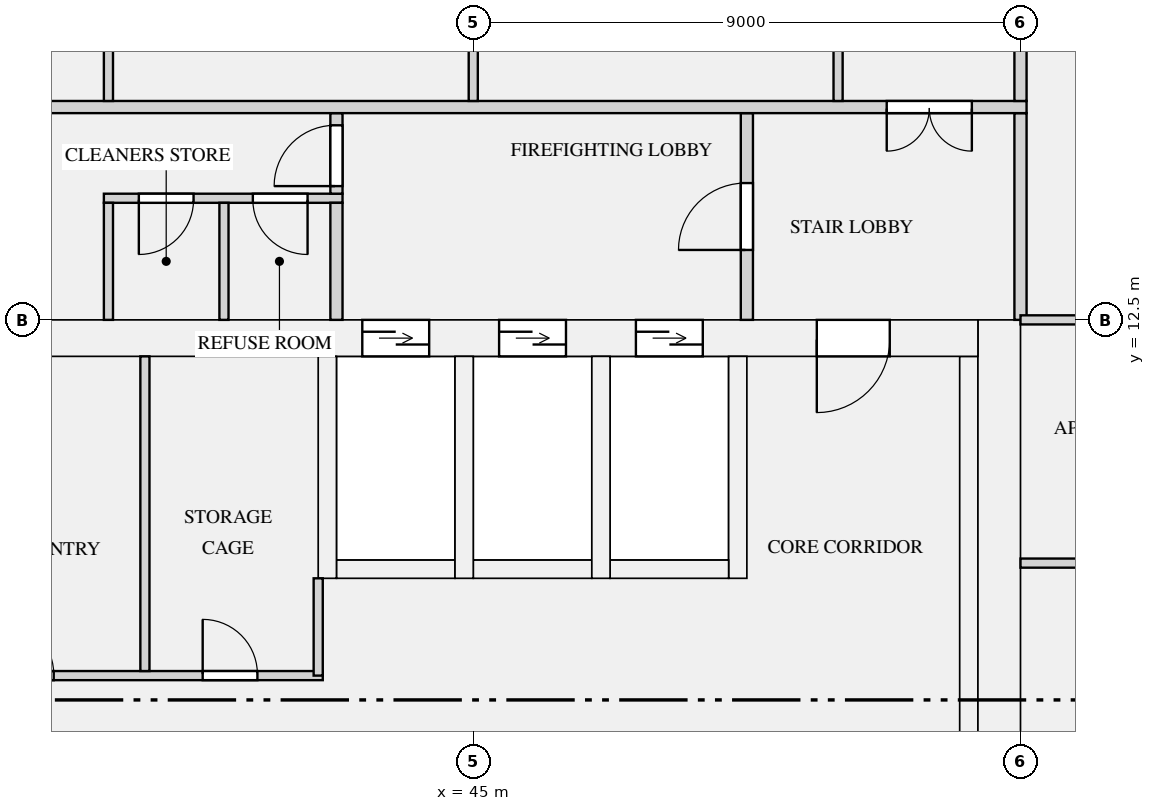
"""IFC4 building model, lengths in metres.
Left out: names, types, materials, properties, quantities, classifications, styles, units other than length and angle.
Written with IfcOpenShell. Run it as: python <this file> out.ifc"""

import sys

from ifc_helpers import new_model, si_unit, direction, frame, frame_2d, origin, place, context, subcontext, project, spatial, rectangle, extrude, element, fill, save


model = new_model("IFC4")
c1 = context("Model", 3, precision=1e-05, world=origin(), true_north=direction((0.0, 1.0)))
c2 = subcontext(c1, "Body", "Model", "MODEL_VIEW")
j1 = project(units=[si_unit("LENGTHUNIT", "METRE"), si_unit("PLANEANGLEUNIT", "RADIAN")], contexts=[c1])
p1 = place(None, origin())
s1 = spatial("IfcSite", under=j1, at=p1, CompositionType="ELEMENT")
p2 = place(p1, origin())
s2 = spatial("IfcBuilding", under=s1, at=p2, CompositionType="ELEMENT")
p3 = place(p2, frame((0.0, 0.0, 141.3)))
s3 = spatial("IfcBuildingStorey", under=s2, at=p3, CompositionType="ELEMENT", Elevation=141.3)
p4 = place(p3, frame((53.65, 0.0, 0.0), z_axis=(0.0, 0.0, 1.0), x_axis=(0.0, 1.0, 0.0)))
e1 = element("IfcWall", 1, at=p4, inside=s3, PredefinedType="SHEAR", context=c2, shape_type="SweptSolid", body=[
    extrude(rectangle(XDim=12.5, YDim=0.7, at=frame_2d((6.25, 0.0))), origin(), (0.0, 0.0, 1.0), 3.15),
])
p5 = place(p3, frame((18.7, 12.2, 0.0), z_axis=(0.0, 0.0, 1.0), x_axis=(1.0, 0.0, 0.0)))
e2 = element("IfcWall", 2, at=p5, inside=s3, PredefinedType="SHEAR", context=c2, shape_type="SweptSolid", body=[
    extrude(rectangle(XDim=34.6, YDim=0.6, at=frame_2d((17.3, 0.0))), origin(), (0.0, 0.0, 1.0), 3.15),
])
p6 = place(p5, frame((24.475, 0.0, 0.0)))
e3 = element("IfcOpeningElement", 3, at=p6, cuts=e2, PredefinedType="OPENING", context=c2, shape_type="SweptSolid", body=[
    extrude(rectangle(XDim=1.1, YDim=2.1, at=frame_2d((0.55, 1.05))), frame((0.0, 0.31, 0.0), z_axis=(0.0, -1.0, 0.0), x_axis=(1.0, 0.0, 0.0)), (0.0, 0.0, 1.0), 0.62),
])
p7 = place(p5, frame((26.725, 0.0, 0.0)))
e4 = element("IfcOpeningElement", 4, at=p7, cuts=e2, PredefinedType="OPENING", context=c2, shape_type="SweptSolid", body=[
    extrude(rectangle(XDim=1.1, YDim=2.1, at=frame_2d((0.55, 1.05))), frame((0.0, 0.31, 0.0), z_axis=(0.0, -1.0, 0.0), x_axis=(1.0, 0.0, 0.0)), (0.0, 0.0, 1.0), 0.62),
])
p8 = place(p5, frame((28.975, 0.0, 0.0)))
e5 = element("IfcOpeningElement", 5, at=p8, cuts=e2, PredefinedType="OPENING", context=c2, shape_type="SweptSolid", body=[
    extrude(rectangle(XDim=1.1, YDim=2.1, at=frame_2d((0.55, 1.05))), frame((0.0, 0.31, 0.0), z_axis=(0.0, -1.0, 0.0), x_axis=(1.0, 0.0, 0.0)), (0.0, 0.0, 1.0), 0.62),
])
p9 = place(p5, frame((14.35, 0.0, 0.0)))
e6 = element("IfcOpeningElement", 6, at=p9, cuts=e2, PredefinedType="OPENING", context=c2, shape_type="SweptSolid", body=[
    extrude(rectangle(XDim=0.9, YDim=2.1, at=frame_2d((0.45, 1.05))), frame((0.0, 0.31, 0.0), z_axis=(0.0, -1.0, 0.0), x_axis=(1.0, 0.0, 0.0)), (0.0, 0.0, 1.0), 0.62),
])
p10 = place(p5, frame((1.45, 0.0, 0.0)))
e7 = element("IfcOpeningElement", 7, at=p10, cuts=e2, PredefinedType="OPENING", context=c2, shape_type="SweptSolid", body=[
    extrude(rectangle(XDim=1.2, YDim=2.1, at=frame_2d((0.6, 1.05))), frame((0.0, 0.31, 0.0), z_axis=(0.0, -1.0, 0.0), x_axis=(1.0, 0.0, 0.0)), (0.0, 0.0, 1.0), 0.62),
])
p11 = place(p5, frame((31.95, 0.0, 0.0)))
e8 = element("IfcOpeningElement", 8, at=p11, cuts=e2, PredefinedType="OPENING", context=c2, shape_type="SweptSolid", body=[
    extrude(rectangle(XDim=1.2, YDim=2.1, at=frame_2d((0.6, 1.05))), frame((0.0, 0.31, 0.0), z_axis=(0.0, -1.0, 0.0), x_axis=(1.0, 0.0, 0.0)), (0.0, 0.0, 1.0), 0.62),
])
p12 = place(p3, frame((53.15, 1.0, 0.0), z_axis=(0.0, 0.0, 1.0), x_axis=(0.0, 1.0, 0.0)))
e9 = element("IfcWall", 9, at=p12, inside=s3, PredefinedType="SHEAR", context=c2, shape_type="SweptSolid", body=[
    extrude(rectangle(XDim=10.9, YDim=0.3, at=frame_2d((5.45, 0.0))), origin(), (0.0, 0.0, 1.0), 3.15),
])
p13 = place(p3, frame((42.75, 8.4, 0.0), z_axis=(0.0, 0.0, 1.0), x_axis=(1.0, 0.0, 0.0)))
e10 = element("IfcWall", 10, at=p13, inside=s3, PredefinedType="SHEAR", context=c2, shape_type="SweptSolid", body=[
    extrude(rectangle(XDim=1.95, YDim=0.3, at=frame_2d((0.975, 0.0))), origin(), (0.0, 0.0, 1.0), 3.15),
])
p14 = place(p3, frame((42.6, 8.25, 0.0), z_axis=(0.0, 0.0, 1.0), x_axis=(0.0, 1.0, 0.0)))
e11 = element("IfcWall", 11, at=p14, inside=s3, PredefinedType="SHEAR", context=c2, shape_type="SweptSolid", body=[
    extrude(rectangle(XDim=3.65, YDim=0.3, at=frame_2d((1.825, 0.0))), origin(), (0.0, 0.0, 1.0), 3.15),
])
p15 = place(p3, frame((45.0, 8.4, 0.0), z_axis=(0.0, 0.0, 1.0), x_axis=(1.0, 0.0, 0.0)))
e12 = element("IfcWall", 12, at=p15, inside=s3, PredefinedType="SHEAR", context=c2, shape_type="SweptSolid", body=[
    extrude(rectangle(XDim=1.95, YDim=0.3, at=frame_2d((0.975, 0.0))), origin(), (0.0, 0.0, 1.0), 3.15),
])
p16 = place(p3, frame((44.85, 8.25, 0.0), z_axis=(0.0, 0.0, 1.0), x_axis=(0.0, 1.0, 0.0)))
e13 = element("IfcWall", 13, at=p16, inside=s3, PredefinedType="SHEAR", context=c2, shape_type="SweptSolid", body=[
    extrude(rectangle(XDim=3.65, YDim=0.3, at=frame_2d((1.825, 0.0))), origin(), (0.0, 0.0, 1.0), 3.15),
])
p17 = place(p3, frame((47.25, 8.4, 0.0), z_axis=(0.0, 0.0, 1.0), x_axis=(1.0, 0.0, 0.0)))
e14 = element("IfcWall", 14, at=p17, inside=s3, PredefinedType="SHEAR", context=c2, shape_type="SweptSolid", body=[
    extrude(rectangle(XDim=1.95, YDim=0.3, at=frame_2d((0.975, 0.0))), origin(), (0.0, 0.0, 1.0), 3.15),
])
for number, where, z_axis, x_axis in (
    (15, (47.1, 8.25, 0.0), (0.0, 0.0, 1.0), (0.0, 1.0, 0.0)),
    (16, (49.35, 8.25, 0.0), (0.0, 0.0, 1.0), (0.0, 1.0, 0.0)),
):
    element("IfcWall", number, at=place(p3, frame(where, z_axis=z_axis, x_axis=x_axis)), inside=s3, PredefinedType="SHEAR", context=c2, shape_type="SweptSolid", body=[
        extrude(rectangle(XDim=3.65, YDim=0.3, at=frame_2d((1.825, 0.0))), origin(), (0.0, 0.0, 1.0), 3.15),
    ])
p18 = place(p3, frame((22.725, 6.65, 0.0), z_axis=(0.0, 0.0, 1.0), x_axis=(1.0, 0.0, 0.0)))
e17 = element("IfcWall", 17, at=p18, inside=s3, PredefinedType="PARTITIONING", context=c2, shape_type="SweptSolid", body=[
    extrude(rectangle(XDim=19.8, YDim=0.15, at=frame_2d((9.9, 0.0))), origin(), (0.0, 0.0, 1.0), 2.83),
])
p19 = place(p18, frame((0.825, 0.0, 0.0)))
e18 = element("IfcOpeningElement", 18, at=p19, cuts=e17, PredefinedType="OPENING", context=c2, shape_type="SweptSolid", body=[
    extrude(rectangle(XDim=0.9, YDim=2.1, at=frame_2d((0.45, 1.05))), frame((0.0, 0.085, 0.0), z_axis=(0.0, -1.0, 0.0), x_axis=(1.0, 0.0, 0.0)), (0.0, 0.0, 1.0), 0.17),
])
p20 = place(p18, frame((5.825, 0.0, 0.0)))
e19 = element("IfcOpeningElement", 19, at=p20, cuts=e17, PredefinedType="OPENING", context=c2, shape_type="SweptSolid", body=[
    extrude(rectangle(XDim=0.9, YDim=2.1, at=frame_2d((0.45, 1.05))), frame((0.0, 0.085, 0.0), z_axis=(0.0, -1.0, 0.0), x_axis=(1.0, 0.0, 0.0)), (0.0, 0.0, 1.0), 0.17),
])
p21 = place(p18, frame((10.325, 0.0, 0.0)))
e20 = element("IfcOpeningElement", 20, at=p21, cuts=e17, PredefinedType="OPENING", context=c2, shape_type="SweptSolid", body=[
    extrude(rectangle(XDim=0.9, YDim=2.1, at=frame_2d((0.45, 1.05))), frame((0.0, 0.085, 0.0), z_axis=(0.0, -1.0, 0.0), x_axis=(1.0, 0.0, 0.0)), (0.0, 0.0, 1.0), 0.17),
])
p22 = place(p18, frame((14.475, 0.0, 0.0)))
e21 = element("IfcOpeningElement", 21, at=p22, cuts=e17, PredefinedType="OPENING", context=c2, shape_type="SweptSolid", body=[
    extrude(rectangle(XDim=0.9, YDim=2.1, at=frame_2d((0.45, 1.05))), frame((0.0, 0.085, 0.0), z_axis=(0.0, -1.0, 0.0), x_axis=(1.0, 0.0, 0.0)), (0.0, 0.0, 1.0), 0.17),
])
p23 = place(p18, frame((17.825, 0.0, 0.0)))
e22 = element("IfcOpeningElement", 22, at=p23, cuts=e17, PredefinedType="OPENING", context=c2, shape_type="SweptSolid", body=[
    extrude(rectangle(XDim=0.9, YDim=2.1, at=frame_2d((0.45, 1.05))), frame((0.0, 0.085, 0.0), z_axis=(0.0, -1.0, 0.0), x_axis=(1.0, 0.0, 0.0)), (0.0, 0.0, 1.0), 0.17),
])
p24 = place(p3, frame((38.925, 14.5, 0.0), z_axis=(0.0, 0.0, 1.0), x_axis=(1.0, 0.0, 0.0)))
e23 = element("IfcWall", 23, at=p24, inside=s3, PredefinedType="PARTITIONING", context=c2, shape_type="SweptSolid", body=[
    extrude(rectangle(XDim=3.925, YDim=0.15, at=frame_2d((1.962, 0.0))), origin(), (0.0, 0.0, 1.0), 2.83),
])
p25 = place(p24, frame((0.575, 0.0, 0.0)))
e24 = element("IfcOpeningElement", 24, at=p25, cuts=e23, PredefinedType="OPENING", context=c2, shape_type="SweptSolid", body=[
    extrude(rectangle(XDim=0.9, YDim=2.1, at=frame_2d((0.45, 1.05))), frame((0.0, 0.085, 0.0), z_axis=(0.0, -1.0, 0.0), x_axis=(1.0, 0.0, 0.0)), (0.0, 0.0, 1.0), 0.17),
])
p26 = place(p24, frame((2.45, 0.0, 0.0)))
e25 = element("IfcOpeningElement", 25, at=p26, cuts=e23, PredefinedType="OPENING", context=c2, shape_type="SweptSolid", body=[
    extrude(rectangle(XDim=0.9, YDim=2.1, at=frame_2d((0.45, 1.05))), frame((0.0, 0.085, 0.0), z_axis=(0.0, -1.0, 0.0), x_axis=(1.0, 0.0, 0.0)), (0.0, 0.0, 1.0), 0.17),
])
p27 = place(p3, frame((42.45, 6.65, 0.0), z_axis=(0.0, 0.0, 1.0), x_axis=(0.0, 1.0, 0.0)))
e26 = element("IfcWall", 26, at=p27, inside=s3, PredefinedType="PARTITIONING", context=c2, shape_type="SweptSolid", body=[
    extrude(rectangle(XDim=1.6, YDim=0.15, at=frame_2d((0.8, 0.0))), origin(), (0.0, 0.0, 1.0), 2.83),
])
p28 = place(p3, frame((39.6, 6.725, 0.0), z_axis=(0.0, 0.0, 1.0), x_axis=(0.0, 1.0, 0.0)))
e27 = element("IfcWall", 27, at=p28, inside=s3, PredefinedType="PARTITIONING", context=c2, shape_type="SweptSolid", body=[
    extrude(rectangle(XDim=5.175, YDim=0.15, at=frame_2d((2.587, 0.0))), origin(), (0.0, 0.0, 1.0), 2.83),
])
for number, where, z_axis, x_axis in (
    (28, (39.0, 12.5, 0.0), (0.0, 0.0, 1.0), (0.0, 1.0, 0.0)),
    (29, (40.9, 12.5, 0.0), (0.0, 0.0, 1.0), (0.0, 1.0, 0.0)),
):
    element("IfcWall", number, at=place(p3, frame(where, z_axis=z_axis, x_axis=x_axis)), inside=s3, PredefinedType="PARTITIONING", context=c2, shape_type="SweptSolid", body=[
        extrude(rectangle(XDim=1.925, YDim=0.15, at=frame_2d((0.962, 0.0))), origin(), (0.0, 0.0, 1.0), 2.83),
    ])
p29 = place(p3, frame((42.75, 12.5, 0.0), z_axis=(0.0, 0.0, 1.0), x_axis=(0.0, 1.0, 0.0)))
e30 = element("IfcWall", 30, at=p29, inside=s3, PredefinedType="PARTITIONING", context=c2, shape_type="SweptSolid", body=[
    extrude(rectangle(XDim=1.925, YDim=0.2, at=frame_2d((0.962, 0.0))), origin(), (0.0, 0.0, 1.0), 2.83),
])
p30 = place(p3, frame((49.5, 12.5, 0.0), z_axis=(0.0, 0.0, 1.0), x_axis=(0.0, 1.0, 0.0)))
e31 = element("IfcWall", 31, at=p30, inside=s3, PredefinedType="PARTITIONING", context=c2, shape_type="SweptSolid", body=[
    extrude(rectangle(XDim=3.4, YDim=0.2, at=frame_2d((1.7, 0.0))), origin(), (0.0, 0.0, 1.0), 2.83),
])
p31 = place(p30, frame((1.15, 0.0, 0.0)))
e32 = element("IfcOpeningElement", 32, at=p31, cuts=e31, PredefinedType="OPENING", context=c2, shape_type="SweptSolid", body=[
    extrude(rectangle(XDim=1.1, YDim=2.1, at=frame_2d((0.55, 1.05))), frame((0.0, 0.11, 0.0), z_axis=(0.0, -1.0, 0.0), x_axis=(1.0, 0.0, 0.0)), (0.0, 0.0, 1.0), 0.22),
])
p32 = place(p3, frame((54.0, 12.5, 0.0), z_axis=(0.0, 0.0, 1.0), x_axis=(0.0, 1.0, 0.0)))
e33 = element("IfcWall", 33, at=p32, inside=s3, PredefinedType="PARTITIONING", context=c2, shape_type="SweptSolid", body=[
    extrude(rectangle(XDim=3.4, YDim=0.2, at=frame_2d((1.7, 0.0))), origin(), (0.0, 0.0, 1.0), 2.83),
])
p33 = place(p3, frame((42.75, 14.575, 0.0), z_axis=(0.0, 0.0, 1.0), x_axis=(0.0, 1.0, 0.0)))
e34 = element("IfcWall", 34, at=p33, inside=s3, PredefinedType="PARTITIONING", context=c2, shape_type="SweptSolid", body=[
    extrude(rectangle(XDim=1.325, YDim=0.2, at=frame_2d((0.663, 0.0))), origin(), (0.0, 0.0, 1.0), 2.83),
])
p34 = place(p33, frame((0.125, 0.0, 0.0)))
e35 = element("IfcOpeningElement", 35, at=p34, cuts=e34, PredefinedType="OPENING", context=c2, shape_type="SweptSolid", body=[
    extrude(rectangle(XDim=1.0, YDim=2.1, at=frame_2d((0.5, 1.05))), frame((0.0, 0.11, 0.0), z_axis=(0.0, -1.0, 0.0), x_axis=(1.0, 0.0, 0.0)), (0.0, 0.0, 1.0), 0.22),
])
p35 = place(p3, frame((54.0, 8.5, 0.0), z_axis=(0.0, 0.0, 1.0), x_axis=(1.0, 0.0, 0.0)))
e36 = element("IfcWall", 36, at=p35, inside=s3, PredefinedType="PARTITIONING", context=c2, shape_type="SweptSolid", body=[
    extrude(rectangle(XDim=17.3, YDim=0.15, at=frame_2d((8.65, 0.0))), origin(), (0.0, 0.0, 1.0), 2.83),
])
p36 = place(p35, frame((1.8, 0.0, 0.0)))
e37 = element("IfcOpeningElement", 37, at=p36, cuts=e36, PredefinedType="OPENING", context=c2, shape_type="SweptSolid", body=[
    extrude(rectangle(XDim=0.9, YDim=2.1, at=frame_2d((0.45, 1.05))), frame((0.0, 0.085, 0.0), z_axis=(0.0, -1.0, 0.0), x_axis=(1.0, 0.0, 0.0)), (0.0, 0.0, 1.0), 0.17),
])
p37 = place(p35, frame((6.3, 0.0, 0.0)))
e38 = element("IfcOpeningElement", 38, at=p37, cuts=e36, PredefinedType="OPENING", context=c2, shape_type="SweptSolid", body=[
    extrude(rectangle(XDim=0.9, YDim=2.1, at=frame_2d((0.45, 1.05))), frame((0.0, 0.085, 0.0), z_axis=(0.0, -1.0, 0.0), x_axis=(1.0, 0.0, 0.0)), (0.0, 0.0, 1.0), 0.17),
])
p38 = place(p35, frame((10.8, 0.0, 0.0)))
e39 = element("IfcOpeningElement", 39, at=p38, cuts=e36, PredefinedType="OPENING", context=c2, shape_type="SweptSolid", body=[
    extrude(rectangle(XDim=0.9, YDim=2.1, at=frame_2d((0.45, 1.05))), frame((0.0, 0.085, 0.0), z_axis=(0.0, -1.0, 0.0), x_axis=(1.0, 0.0, 0.0)), (0.0, 0.0, 1.0), 0.17),
])
p39 = place(p35, frame((15.025, 0.0, 0.0)))
e40 = element("IfcOpeningElement", 40, at=p39, cuts=e36, PredefinedType="OPENING", context=c2, shape_type="SweptSolid", body=[
    extrude(rectangle(XDim=0.9, YDim=2.1, at=frame_2d((0.45, 1.05))), frame((0.0, 0.085, 0.0), z_axis=(0.0, -1.0, 0.0), x_axis=(1.0, 0.0, 0.0)), (0.0, 0.0, 1.0), 0.17),
])
p40 = place(p3, frame((54.0, 12.5, 0.0), z_axis=(0.0, 0.0, 1.0), x_axis=(1.0, 0.0, 0.0)))
e41 = element("IfcWall", 41, at=p40, inside=s3, PredefinedType="PARTITIONING", context=c2, shape_type="SweptSolid", body=[
    extrude(rectangle(XDim=17.3, YDim=0.15, at=frame_2d((8.65, 0.0))), origin(), (0.0, 0.0, 1.0), 2.83),
])
p41 = place(p40, frame((1.5, 0.0, 0.0)))
e42 = element("IfcOpeningElement", 42, at=p41, cuts=e41, PredefinedType="OPENING", context=c2, shape_type="SweptSolid", body=[
    extrude(rectangle(XDim=1.5, YDim=2.1, at=frame_2d((0.75, 1.05))), frame((0.0, 0.085, 0.0), z_axis=(0.0, -1.0, 0.0), x_axis=(1.0, 0.0, 0.0)), (0.0, 0.0, 1.0), 0.17),
])
p42 = place(p40, frame((7.05, 0.0, 0.0)))
e43 = element("IfcOpeningElement", 43, at=p42, cuts=e41, PredefinedType="OPENING", context=c2, shape_type="SweptSolid", body=[
    extrude(rectangle(XDim=0.9, YDim=2.1, at=frame_2d((0.45, 1.05))), frame((0.0, 0.085, 0.0), z_axis=(0.0, -1.0, 0.0), x_axis=(1.0, 0.0, 0.0)), (0.0, 0.0, 1.0), 0.17),
])
p43 = place(p40, frame((12.75, 0.0, 0.0)))
e44 = element("IfcOpeningElement", 44, at=p43, cuts=e41, PredefinedType="OPENING", context=c2, shape_type="SweptSolid", body=[
    extrude(rectangle(XDim=1.5, YDim=2.1, at=frame_2d((0.75, 1.05))), frame((0.0, 0.085, 0.0), z_axis=(0.0, -1.0, 0.0), x_axis=(1.0, 0.0, 0.0)), (0.0, 0.0, 1.0), 0.17),
])
p44 = place(p3, frame((17.9, 16.0, 0.0), z_axis=(0.0, 0.0, 1.0), x_axis=(1.0, 0.0, 0.0)))
e45 = element("IfcWall", 45, at=p44, inside=s3, PredefinedType="PARTITIONING", context=c2, shape_type="SweptSolid", body=[
    extrude(rectangle(XDim=36.2, YDim=0.2, at=frame_2d((18.1, 0.0))), origin(), (0.0, 0.0, 1.0), 2.83),
])
p45 = place(p44, frame((0.9, 0.0, 0.0)))
e46 = element("IfcOpeningElement", 46, at=p45, cuts=e45, PredefinedType="OPENING", context=c2, shape_type="SweptSolid", body=[
    extrude(rectangle(XDim=1.4, YDim=2.1, at=frame_2d((0.7, 1.05))), frame((0.0, 0.11, 0.0), z_axis=(0.0, -1.0, 0.0), x_axis=(1.0, 0.0, 0.0)), (0.0, 0.0, 1.0), 0.22),
])
p46 = place(p44, frame((33.9, 0.0, 0.0)))
e47 = element("IfcOpeningElement", 47, at=p46, cuts=e45, PredefinedType="OPENING", context=c2, shape_type="SweptSolid", body=[
    extrude(rectangle(XDim=1.4, YDim=2.1, at=frame_2d((0.7, 1.05))), frame((0.0, 0.11, 0.0), z_axis=(0.0, -1.0, 0.0), x_axis=(1.0, 0.0, 0.0)), (0.0, 0.0, 1.0), 0.22),
])
p47 = place(p3, frame((54.0, 16.1, 0.0), z_axis=(0.0, 0.0, 1.0), x_axis=(0.0, 1.0, 0.0)))
e48 = element("IfcWall", 48, at=p47, inside=s3, PredefinedType="PARTITIONING", context=c2, shape_type="SweptSolid", body=[
    extrude(rectangle(XDim=7.8, YDim=0.2, at=frame_2d((3.9, 0.0))), origin(), (0.0, 0.0, 1.0), 2.83),
])
p48 = place(p47, frame((1.85, 0.0, 0.0)))
e49 = element("IfcOpeningElement", 49, at=p48, cuts=e48, PredefinedType="OPENING", context=c2, shape_type="SweptSolid", body=[
    extrude(rectangle(XDim=1.1, YDim=2.1, at=frame_2d((0.55, 1.05))), frame((0.0, 0.11, 0.0), z_axis=(0.0, -1.0, 0.0), x_axis=(1.0, 0.0, 0.0)), (0.0, 0.0, 1.0), 0.22),
])
for number, where, z_axis, x_axis in (
    (50, (51.0, 16.1, 0.0), (0.0, 0.0, 1.0), (0.0, 1.0, 0.0)),
    (51, (45.0, 16.1, 0.0), (0.0, 0.0, 1.0), (0.0, 1.0, 0.0)),
    (52, (39.0, 16.1, 0.0), (0.0, 0.0, 1.0), (0.0, 1.0, 0.0)),
):
    element("IfcWall", number, at=place(p3, frame(where, z_axis=z_axis, x_axis=x_axis)), inside=s3, PredefinedType="PARTITIONING", context=c2, shape_type="SweptSolid", body=[
        extrude(rectangle(XDim=4.825, YDim=0.15, at=frame_2d((2.413, 0.0))), origin(), (0.0, 0.0, 1.0), 2.83),
    ])
p49 = place(p6, origin())
e53 = element("IfcDoor", 53, at=p49, inside=s3, OperationType="DOUBLE_DOOR_SLIDING", PredefinedType="DOOR", context=c2, shape_type="SweptSolid", body=[
    extrude(rectangle(XDim=1.1, YDim=2.1, at=frame_2d((0.55, 1.05))), frame((0.0, 0.025, 0.0), z_axis=(0.0, -1.0, 0.0), x_axis=(1.0, 0.0, 0.0)), (0.0, 0.0, 1.0), 0.05),
])
fill(e3, e53)
p50 = place(p7, origin())
e54 = element("IfcDoor", 54, at=p50, inside=s3, OperationType="DOUBLE_DOOR_SLIDING", PredefinedType="DOOR", context=c2, shape_type="SweptSolid", body=[
    extrude(rectangle(XDim=1.1, YDim=2.1, at=frame_2d((0.55, 1.05))), frame((0.0, 0.025, 0.0), z_axis=(0.0, -1.0, 0.0), x_axis=(1.0, 0.0, 0.0)), (0.0, 0.0, 1.0), 0.05),
])
fill(e4, e54)
p51 = place(p8, origin())
e55 = element("IfcDoor", 55, at=p51, inside=s3, OperationType="DOUBLE_DOOR_SLIDING", PredefinedType="DOOR", context=c2, shape_type="SweptSolid", body=[
    extrude(rectangle(XDim=1.1, YDim=2.1, at=frame_2d((0.55, 1.05))), frame((0.0, 0.025, 0.0), z_axis=(0.0, -1.0, 0.0), x_axis=(1.0, 0.0, 0.0)), (0.0, 0.0, 1.0), 0.05),
])
fill(e5, e55)
p52 = place(p25, frame((0.9, 0.0, 0.0), z_axis=(0.0, 0.0, 1.0), x_axis=(-1.0, 0.0, 0.0)))
e56 = element("IfcDoor", 56, at=p52, inside=s3, OperationType="SINGLE_SWING_RIGHT", PredefinedType="DOOR", context=c2, shape_type="SweptSolid", body=[
    extrude(rectangle(XDim=0.9, YDim=2.1, at=frame_2d((0.45, 1.05))), frame((0.0, 0.025, 0.0), z_axis=(0.0, -1.0, 0.0), x_axis=(1.0, 0.0, 0.0)), (0.0, 0.0, 1.0), 0.05),
])
fill(e24, e56)
p53 = place(p26, frame((0.9, 0.0, 0.0), z_axis=(0.0, 0.0, 1.0), x_axis=(-1.0, 0.0, 0.0)))
e57 = element("IfcDoor", 57, at=p53, inside=s3, OperationType="SINGLE_SWING_LEFT", PredefinedType="DOOR", context=c2, shape_type="SweptSolid", body=[
    extrude(rectangle(XDim=0.9, YDim=2.1, at=frame_2d((0.45, 1.05))), frame((0.0, 0.025, 0.0), z_axis=(0.0, -1.0, 0.0), x_axis=(1.0, 0.0, 0.0)), (0.0, 0.0, 1.0), 0.05),
])
fill(e25, e57)
p54 = place(p22, origin())
e58 = element("IfcDoor", 58, at=p54, inside=s3, OperationType="SINGLE_SWING_LEFT", PredefinedType="DOOR", context=c2, shape_type="SweptSolid", body=[
    extrude(rectangle(XDim=0.9, YDim=2.1, at=frame_2d((0.45, 1.05))), frame((0.0, 0.025, 0.0), z_axis=(0.0, -1.0, 0.0), x_axis=(1.0, 0.0, 0.0)), (0.0, 0.0, 1.0), 0.05),
])
fill(e21, e58)
p55 = place(p23, origin())
e59 = element("IfcDoor", 59, at=p55, inside=s3, OperationType="SINGLE_SWING_LEFT", PredefinedType="DOOR", context=c2, shape_type="SweptSolid", body=[
    extrude(rectangle(XDim=0.9, YDim=2.1, at=frame_2d((0.45, 1.05))), frame((0.0, 0.025, 0.0), z_axis=(0.0, -1.0, 0.0), x_axis=(1.0, 0.0, 0.0)), (0.0, 0.0, 1.0), 0.05),
])
fill(e22, e59)
p56 = place(p11, frame((1.2, 0.0, 0.0), z_axis=(0.0, 0.0, 1.0), x_axis=(-1.0, 0.0, 0.0)))
e60 = element("IfcDoor", 60, at=p56, inside=s3, OperationType="SINGLE_SWING_RIGHT", PredefinedType="DOOR", context=c2, shape_type="SweptSolid", body=[
    extrude(rectangle(XDim=1.2, YDim=2.1, at=frame_2d((0.6, 1.05))), frame((0.0, 0.025, 0.0), z_axis=(0.0, -1.0, 0.0), x_axis=(1.0, 0.0, 0.0)), (0.0, 0.0, 1.0), 0.05),
])
fill(e8, e60)
p57 = place(p34, origin())
e61 = element("IfcDoor", 61, at=p57, inside=s3, OperationType="SINGLE_SWING_LEFT", PredefinedType="DOOR", context=c2, shape_type="SweptSolid", body=[
    extrude(rectangle(XDim=1.0, YDim=2.1, at=frame_2d((0.5, 1.05))), frame((0.0, 0.025, 0.0), z_axis=(0.0, -1.0, 0.0), x_axis=(1.0, 0.0, 0.0)), (0.0, 0.0, 1.0), 0.05),
])
fill(e35, e61)
p58 = place(p31, origin())
e62 = element("IfcDoor", 62, at=p58, inside=s3, OperationType="SINGLE_SWING_LEFT", PredefinedType="DOOR", context=c2, shape_type="SweptSolid", body=[
    extrude(rectangle(XDim=1.1, YDim=2.1, at=frame_2d((0.55, 1.05))), frame((0.0, 0.025, 0.0), z_axis=(0.0, -1.0, 0.0), x_axis=(1.0, 0.0, 0.0)), (0.0, 0.0, 1.0), 0.05),
])
fill(e32, e62)
p59 = place(p46, frame((1.4, 0.0, 0.0), z_axis=(0.0, 0.0, 1.0), x_axis=(-1.0, 0.0, 0.0)))
e63 = element("IfcDoor", 63, at=p59, inside=s3, OperationType="DOUBLE_DOOR_SINGLE_SWING", PredefinedType="DOOR", context=c2, shape_type="SweptSolid", body=[
    extrude(rectangle(XDim=1.4, YDim=2.1, at=frame_2d((0.7, 1.05))), frame((0.0, 0.025, 0.0), z_axis=(0.0, -1.0, 0.0), x_axis=(1.0, 0.0, 0.0)), (0.0, 0.0, 1.0), 0.05),
])
fill(e47, e63)
save(model, sys.argv[1])
